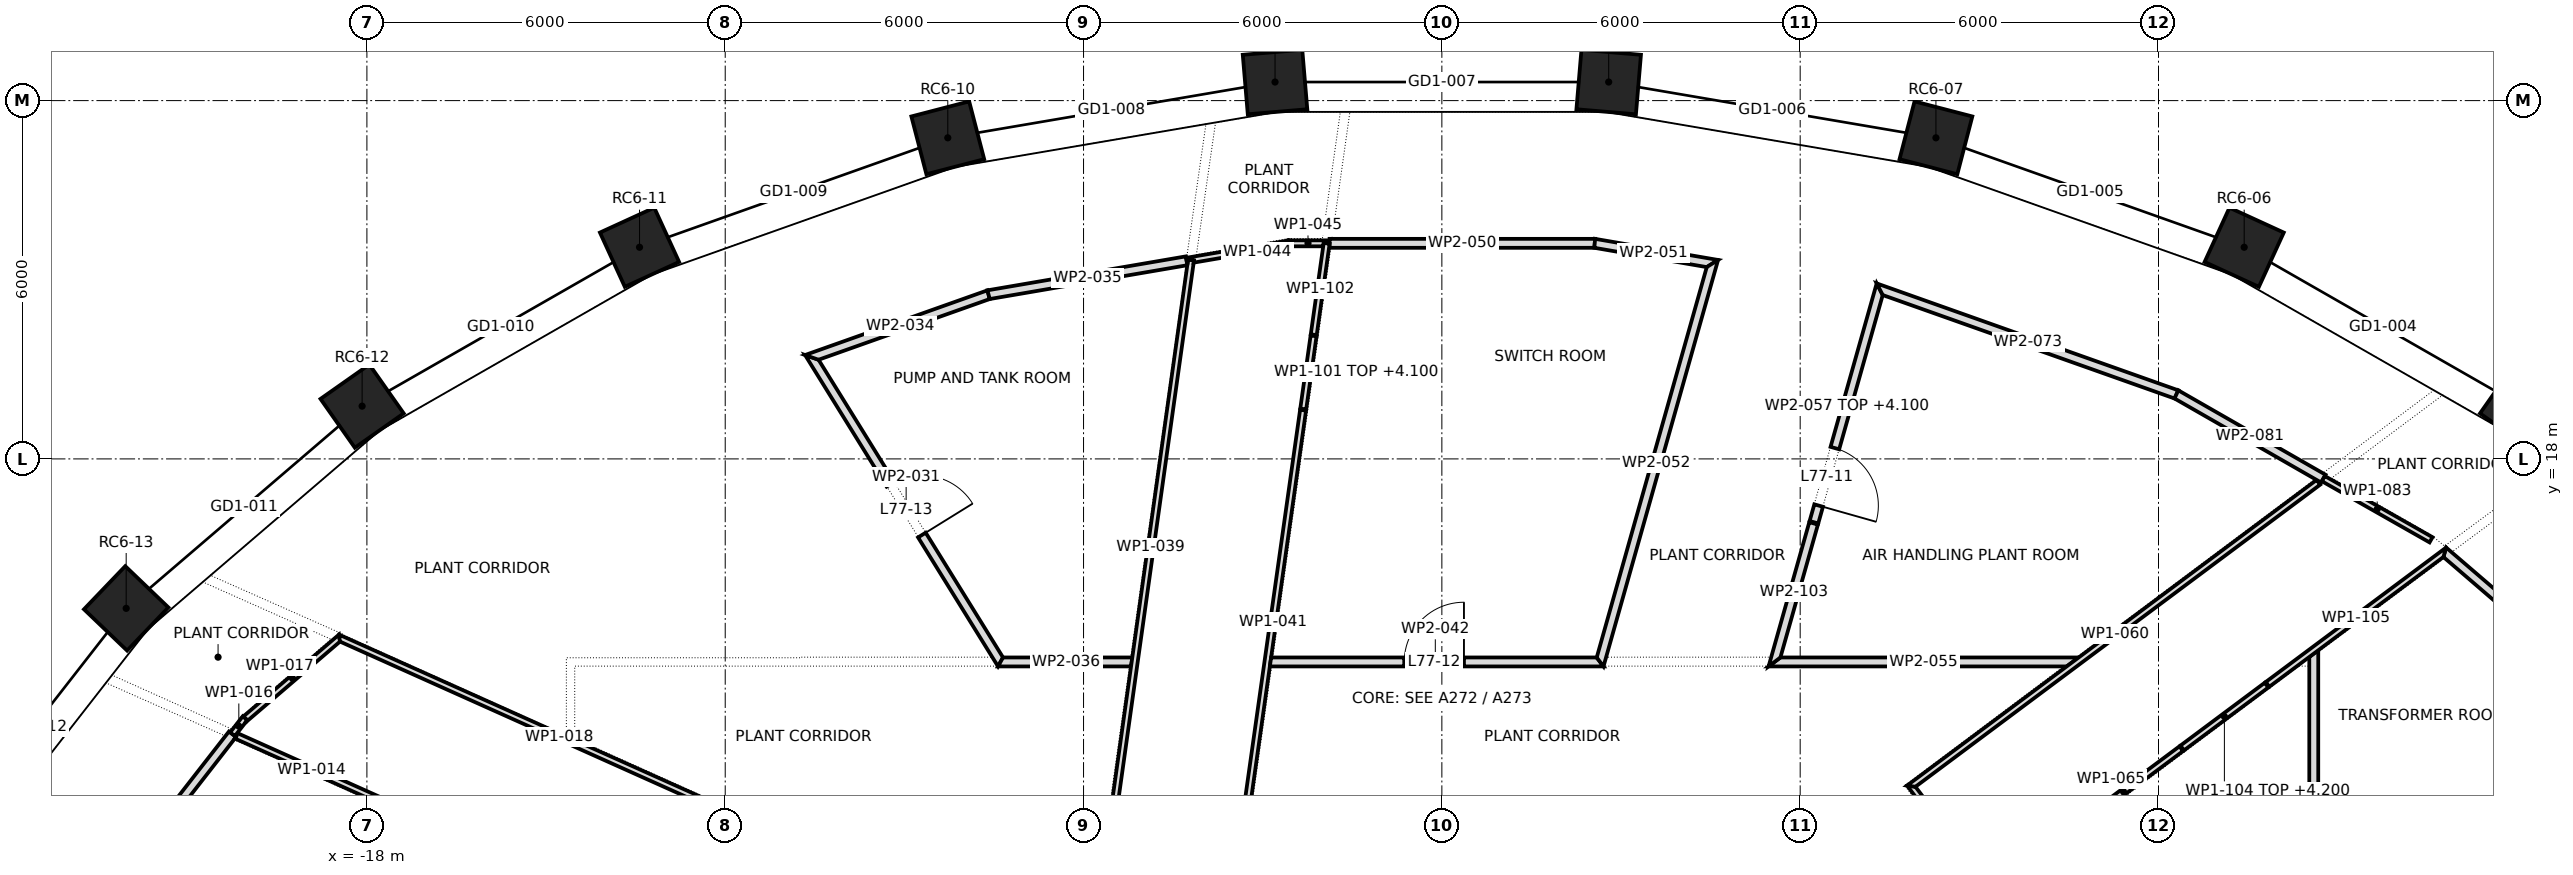
"""IFC4 building model, lengths in metres.
Left out: names, types, materials, properties, quantities, classifications, styles, units other than length and angle.
Written with IfcOpenShell. Run it as: python <this file> out.ifc"""

import sys

from ifc_helpers import new_model, si_unit, direction, frame, frame_2d, origin, origin_2d, place, context, subcontext, project, spatial, polyline, rectangle, outline, extrude, element, fill, save


model = new_model("IFC4")
c1 = context("Model", 3, precision=1e-05, world=origin(), true_north=direction((0.0, 1.0)))
c2 = subcontext(c1, "Body", "Model", "MODEL_VIEW")
j1 = project(units=[si_unit("LENGTHUNIT", "METRE"), si_unit("PLANEANGLEUNIT", "RADIAN")], contexts=[c1])
p1 = place(None, origin())
s1 = spatial("IfcSite", under=j1, at=p1, CompositionType="ELEMENT")
p2 = place(p1, origin())
s2 = spatial("IfcBuilding", under=s1, at=p2, CompositionType="ELEMENT")
p3 = place(p2, frame((0.0, 0.0, 328.3)))
s3 = spatial("IfcBuildingStorey", under=s2, at=p3, CompositionType="ELEMENT", Elevation=328.3)
for number, where, z_axis, x_axis in (
    (1, (18.08, 18.884, 0.0), (0.0, 0.0, 1.0), (-0.818, 0.575, 0.0)),
    (2, (13.435, 21.544, 0.0), (0.0, 0.0, 1.0), (-0.909, 0.417, 0.0)),
    (3, (8.273, 23.377, 0.0), (0.0, 0.0, 1.0), (-0.968, 0.252, 0.0)),
    (4, (2.793, 24.311, 0.0), (0.0, 0.0, 1.0), (-0.996, 0.084, 0.0)),
    (5, (-2.793, 24.311, 0.0), (0.0, 0.0, 1.0), (-0.996, -0.084, 0.0)),
    (6, (-8.273, 23.377, 0.0), (0.0, 0.0, 1.0), (-0.968, -0.252, 0.0)),
    (7, (-13.435, 21.544, 0.0), (0.0, 0.0, 1.0), (-0.909, -0.417, 0.0)),
    (8, (-18.08, 18.884, 0.0), (0.0, 0.0, 1.0), (-0.818, -0.575, 0.0)),
    (9, (-22.031, 15.497, 0.0), (0.0, 0.0, 1.0), (-0.692, -0.722, 0.0)),
):
    element("IfcColumn", number, at=place(p3, frame(where, z_axis=z_axis, x_axis=x_axis)), inside=s3, PredefinedType="COLUMN", context=c2, shape_type="SweptSolid", body=[
        extrude(rectangle(XDim=1.0, YDim=1.0, at=origin_2d()), origin(), (0.0, 0.0, 1.0), 5.0),
    ])
p4 = place(p3, frame((-20.25, 13.39, 0.0), z_axis=(0.0, 0.0, 1.0), x_axis=(-0.614788449528, -0.788692057984, 0.0)))
e10 = element("IfcWall", 10, at=p4, inside=s3, PredefinedType="PARTITIONING", context=c2, shape_type="SweptSolid", body=[
    extrude(outline(polyline([(4.205, -0.075), (4.205, -0.075), (4.189, 0.075), (2.792, 0.075), (1.396, 0.075), (0.0, 0.075), (0.0, -0.075), (1.402, -0.075), (2.803, -0.075), (4.205, -0.075)])), origin(), (0.0, 0.0, 1.0), 4.65),
])
p5 = place(p3, frame((-20.192, 13.364, 0.0), z_axis=(0.0, 0.0, 1.0), x_axis=(0.912635066967, -0.408775286121, 0.0)))
e11 = element("IfcWall", 11, at=p5, inside=s3, PredefinedType="PARTITIONING", context=c2, shape_type="SweptSolid", body=[
    extrude(outline(polyline([(0.0, 0.05), (0.0, -0.016), (0.009, -0.018), (0.001, -0.05), (1.387, -0.05), (2.773, -0.05), (2.773, 0.05), (1.386, 0.05), (0.0, 0.05)])), origin(), (0.0, 0.0, 1.0), 4.65),
])
p6 = place(p3, frame((-20.039, 13.659, 0.0), z_axis=(0.0, 0.0, 1.0), x_axis=(-0.61586559452, -0.787851235632, 0.0)))
e12 = element("IfcWall", 12, at=p6, inside=s3, PredefinedType="PARTITIONING", context=c2, shape_type="SweptSolid", body=[
    extrude(rectangle(XDim=0.342, YDim=0.1, at=frame_2d((0.171, 0.0))), origin(), (0.0, 0.0, 1.0), 4.65),
])
p7 = place(p3, frame((-18.435, 15.02, 0.0), z_axis=(0.0, 0.0, 1.0), x_axis=(-0.759626055976, -0.650360096471, 0.0)))
e13 = element("IfcWall", 13, at=p7, inside=s3, PredefinedType="PARTITIONING", context=c2, shape_type="SweptSolid", body=[
    extrude(outline(polyline([(0.0, -0.05), (2.112, -0.05), (2.094, 0.039), (2.145, 0.05), (2.145, 0.05), (0.063, 0.05), (0.034, 0.003), (0.0, -0.05)])), origin(), (0.0, 0.0, 1.0), 4.65),
])
p8 = place(p3, frame((-18.488, 15.012, 0.0), z_axis=(0.0, 0.0, 1.0), x_axis=(0.912473613394, -0.409135558048, 0.0)))
e14 = element("IfcWall", 14, at=p8, inside=s3, PredefinedType="PARTITIONING", context=c2, shape_type="SweptSolid", body=[
    extrude(outline(polyline([(0.0, 0.05), (0.0, 0.05), (0.063, -0.05), (1.67, -0.05), (3.277, -0.05), (4.883, -0.05), (6.49, -0.05), (8.096, -0.05), (8.096, 0.05), (6.477, 0.05), (4.858, 0.05), (3.239, 0.05), (1.619, 0.05), (0.0, 0.05)])), origin(), (0.0, 0.0, 1.0), 4.65),
])
p9 = place(p3, frame((-10.599, 19.779, 0.0), z_axis=(0.0, 0.0, 1.0), x_axis=(0.526721747685, -0.850037764171, 0.0)))
e15 = element("IfcWall", 15, at=p9, inside=s3, PredefinedType="PARTITIONING", context=c2, shape_type="SweptSolid", body=[
    extrude(outline(polyline([(0.0, -0.075), (1.534, -0.075), (3.067, -0.075), (4.601, -0.075), (6.135, -0.075), (6.051, 0.075), (4.096, 0.075), (2.141, 0.075), (0.186, 0.075), (0.0, -0.075), (0.0, -0.075)])), origin(), (0.0, 0.0, 1.0), 4.65),
])
p10 = place(p9, frame((2.593, 0.0, 0.0)))
e16 = element("IfcOpeningElement", 16, at=p10, cuts=e15, PredefinedType="OPENING", context=c2, shape_type="SweptSolid", body=[
    extrude(rectangle(XDim=1.0, YDim=2.1, at=frame_2d((0.5, 1.05))), frame((0.0, 0.087, 0.0), z_axis=(0.0, -1.0, 0.0), x_axis=(1.0, 0.0, 0.0)), (0.0, 0.0, 1.0), 0.174),
])
p11 = place(p3, frame((-7.584, 20.752, 0.0), z_axis=(0.0, 0.0, 1.0), x_axis=(-0.942459148143, -0.334321333571, 0.0)))
e17 = element("IfcWall", 17, at=p11, inside=s3, PredefinedType="PARTITIONING", context=c2, shape_type="SweptSolid", body=[
    extrude(outline(polyline([(0.0, -0.075), (1.62, -0.075), (3.24, -0.075), (3.054, 0.075), (1.533, 0.075), (0.013, 0.075), (0.0, -0.074), (0.0, -0.075)])), origin(), (0.0, 0.0, 1.0), 4.65),
])
p12 = place(p3, frame((-7.596, 20.749, 0.0), z_axis=(0.0, 0.0, 1.0), x_axis=(0.9856701175, 0.168684378254, 0.0)))
e18 = element("IfcWall", 18, at=p12, inside=s3, PredefinedType="PARTITIONING", context=c2, shape_type="SweptSolid", body=[
    extrude(outline(polyline([(3.371, 0.075), (1.686, 0.075), (0.0, 0.075), (0.013, -0.075), (1.692, -0.075), (3.371, -0.075), (3.371, 0.075)])), origin(), (0.0, 0.0, 1.0), 4.65),
])
p13 = place(p3, frame((-7.432, 14.6, 0.0), z_axis=(0.0, 0.0, 1.0), x_axis=(1.0, 0.0, 0.0)))
e19 = element("IfcWall", 19, at=p13, inside=s3, PredefinedType="PARTITIONING", context=c2, shape_type="SweptSolid", body=[
    extrude(outline(polyline([(0.0, -0.075), (2.228, -0.075), (2.248, 0.074), (2.248, 0.075), (0.084, 0.075), (0.084, 0.075), (0.084, 0.075), (0.042, 0.0), (0.0, -0.075)])), origin(), (0.0, 0.0, 1.0), 4.65),
])
p14 = place(p3, frame((-5.55, 11.7, 0.0), z_axis=(0.0, 0.0, 1.0), x_axis=(0.138844805467, 0.990314152173, 0.0)))
e20 = element("IfcWall", 20, at=p14, inside=s3, PredefinedType="PARTITIONING", context=c2, shape_type="SweptSolid", body=[
    extrude(rectangle(XDim=9.726, YDim=0.1, at=frame_2d((4.863, 0.0))), origin(), (0.0, 0.0, 1.0), 4.65),
])
p15 = place(p3, frame((-3.33, 11.7, 0.0), z_axis=(0.0, 0.0, 1.0), x_axis=(0.140005886866, 0.990150671182, 0.0)))
e21 = element("IfcWall", 21, at=p15, inside=s3, PredefinedType="PARTITIONING", context=c2, shape_type="SweptSolid", body=[
    extrude(rectangle(XDim=7.197, YDim=0.1, at=frame_2d((3.598, 0.0))), origin(), (0.0, 0.0, 1.0), 4.65),
])
p16 = place(p3, frame((-2.88, 14.6, 0.0), z_axis=(0.0, 0.0, 1.0), x_axis=(1.0, 0.0, 0.0)))
e22 = element("IfcWall", 22, at=p16, inside=s3, PredefinedType="PARTITIONING", context=c2, shape_type="SweptSolid", body=[
    extrude(outline(polyline([(0.0, -0.075), (1.862, -0.075), (3.724, -0.075), (5.587, -0.075), (5.53, 0.0), (5.473, 0.075), (5.473, 0.075), (5.473, 0.075), (3.656, 0.075), (1.838, 0.075), (0.021, 0.075), (0.0, -0.073), (0.0, -0.075)])), origin(), (0.0, 0.0, 1.0), 4.65),
])
p17 = place(p16, frame((2.25, 0.0, 0.0)))
e23 = element("IfcOpeningElement", 23, at=p17, cuts=e22, PredefinedType="OPENING", context=c2, shape_type="SweptSolid", body=[
    extrude(rectangle(XDim=1.0, YDim=2.1, at=frame_2d((0.5, 1.05))), frame((0.0, 0.087, 0.0), z_axis=(0.0, -1.0, 0.0), x_axis=(1.0, 0.0, 0.0)), (0.0, 0.0, 1.0), 0.174),
])
p18 = place(p3, frame((-2.556, 21.611, 0.0), z_axis=(0.0, 0.0, 1.0), x_axis=(-0.985746626095, -0.16823670569, 0.0)))
e24 = element("IfcWall", 24, at=p18, inside=s3, PredefinedType="PARTITIONING", context=c2, shape_type="SweptSolid", body=[
    extrude(outline(polyline([(0.0, -0.05), (1.743, -0.05), (1.743, 0.05), (1.736, 0.05), (1.715, -0.016), (1.62, 0.014), (1.631, 0.05), (0.008, 0.05), (0.008, 0.05), (0.008, 0.05), (0.004, 0.0), (0.0, -0.049), (0.0, -0.05)])), origin(), (0.0, 0.0, 1.0), 4.65),
])
p19 = place(p3, frame((-1.881, 21.61, 0.0), z_axis=(0.0, 0.0, 1.0), x_axis=(-1.0, 0.0, 0.0)))
e25 = element("IfcWall", 25, at=p19, inside=s3, PredefinedType="PARTITIONING", context=c2, shape_type="SweptSolid", body=[
    extrude(outline(polyline([(0.684, -0.05), (0.684, -0.05), (0.684, -0.05), (0.667, 0.049), (0.675, 0.05), (0.106, 0.05), (0.098, -0.007), (0.0, 0.007), (0.0, -0.05), (0.684, -0.05)])), origin(), (0.0, 0.0, 1.0), 4.65),
])
p20 = place(p3, frame((2.566, 21.61, 0.0), z_axis=(0.0, 0.0, 1.0), x_axis=(-1.0, 0.0, 0.0)))
e26 = element("IfcWall", 26, at=p20, inside=s3, PredefinedType="PARTITIONING", context=c2, shape_type="SweptSolid", body=[
    extrude(outline(polyline([(4.446, 0.075), (2.969, 0.075), (1.491, 0.075), (0.013, 0.075), (0.0, -0.075), (1.482, -0.075), (2.964, -0.075), (4.446, -0.075), (4.446, 0.075)])), origin(), (0.0, 0.0, 1.0), 4.65),
])
p21 = place(p3, frame((2.554, 21.611, 0.0), z_axis=(0.0, 0.0, 1.0), x_axis=(0.985576619606, -0.169229804956, 0.0)))
e27 = element("IfcWall", 27, at=p21, inside=s3, PredefinedType="PARTITIONING", context=c2, shape_type="SweptSolid", body=[
    extrude(outline(polyline([(0.013, -0.075), (1.922, -0.075), (2.089, 0.075), (2.089, 0.075), (0.0, 0.075), (0.0, 0.075), (0.013, -0.075)])), origin(), (0.0, 0.0, 1.0), 4.65),
])
p22 = place(p3, frame((2.635, 14.545, 0.0), z_axis=(0.0, 0.0, 1.0), x_axis=(0.271290420786, 0.962497536407, 0.0)))
e28 = element("IfcWall", 28, at=p22, inside=s3, PredefinedType="PARTITIONING", context=c2, shape_type="SweptSolid", body=[
    extrude(outline(polyline([(0.0, -0.075), (1.768, -0.075), (3.536, -0.075), (5.304, -0.075), (7.072, -0.075), (6.905, 0.075), (5.207, 0.075), (3.509, 0.075), (1.812, 0.075), (0.114, 0.075), (0.0, -0.075)])), origin(), (0.0, 0.0, 1.0), 4.65),
])
p23 = place(p3, frame((5.471, 14.6, 0.0), z_axis=(0.0, 0.0, 1.0), x_axis=(1.0, 0.0, 0.0)))
e29 = element("IfcWall", 29, at=p23, inside=s3, PredefinedType="PARTITIONING", context=c2, shape_type="SweptSolid", body=[
    extrude(outline(polyline([(0.0, -0.075), (1.664, -0.075), (3.328, -0.075), (4.992, -0.075), (5.193, 0.075), (5.193, 0.075), (3.528, 0.075), (1.863, 0.075), (0.198, 0.075), (0.198, 0.075), (0.198, 0.075), (0.099, 0.0), (0.0, -0.075)])), origin(), (0.0, 0.0, 1.0), 4.65),
])
p24 = place(p3, frame((7.354, 20.919, 0.0), z_axis=(0.0, 0.0, 1.0), x_axis=(-0.271630861441, -0.9624015145, 0.0)))
e30 = element("IfcWall", 30, at=p24, inside=s3, PredefinedType="PARTITIONING", context=c2, shape_type="SweptSolid", body=[
    extrude(outline(polyline([(4.144, 0.075), (2.152, 0.075), (0.16, 0.075), (0.0, -0.075), (1.382, -0.075), (2.763, -0.075), (4.144, -0.075), (4.144, 0.075)])), origin(), (0.0, 0.0, 1.0), 4.1),
])
p25 = place(p24, frame((2.844, 0.0, 0.0)))
e31 = element("IfcOpeningElement", 31, at=p25, cuts=e30, PredefinedType="OPENING", context=c2, shape_type="SweptSolid", body=[
    extrude(rectangle(XDim=1.0, YDim=2.1, at=frame_2d((0.5, 1.05))), frame((0.0, 0.087, 0.0), z_axis=(0.0, -1.0, 0.0), x_axis=(1.0, 0.0, 0.0)), (0.0, 0.0, 1.0), 0.174),
])
p26 = place(p3, frame((7.83, 12.56, 0.0), z_axis=(0.0, 0.0, 1.0), x_axis=(0.603146922662, -0.79763010831, 0.0)))
e32 = element("IfcWall", 32, at=p26, inside=s3, PredefinedType="PARTITIONING", context=c2, shape_type="SweptSolid", body=[
    extrude(outline(polyline([(1.078, 0.05), (0.101, 0.05), (0.0, -0.05), (0.0, -0.05), (1.078, -0.05), (1.078, 0.05)])), origin(), (0.0, 0.0, 1.0), 4.65),
])
p27 = place(p3, frame((7.82, 12.49, 0.0), z_axis=(0.0, 0.0, 1.0), x_axis=(0.801408213351, 0.598117777343, 0.0)))
e33 = element("IfcWall", 33, at=p27, inside=s3, PredefinedType="PARTITIONING", context=c2, shape_type="SweptSolid", body=[
    extrude(outline(polyline([(0.0, 0.05), (0.0, 0.05), (0.101, -0.05), (1.792, -0.05), (3.483, -0.05), (5.175, -0.05), (6.866, -0.05), (8.558, -0.05), (8.558, 0.05), (6.846, 0.05), (5.135, 0.05), (3.423, 0.05), (1.712, 0.05), (0.0, 0.05)])), origin(), (0.0, 0.0, 1.0), 4.65),
])
p28 = place(p3, frame((10.44, 11.7, 0.0), z_axis=(0.0, 0.0, 1.0), x_axis=(0.801719620775, 0.597700300873, 0.0)))
e34 = element("IfcWall", 34, at=p28, inside=s3, PredefinedType="PARTITIONING", context=c2, shape_type="SweptSolid", body=[
    extrude(outline(polyline([(0.0, 0.05), (0.0, -0.05), (2.432, -0.05), (2.432, 0.05), (0.0, 0.05)])), origin(), (0.0, 0.0, 1.0), 4.65),
])
p29 = place(p3, frame((12.306, 19.078, 0.0), z_axis=(0.0, 0.0, 1.0), x_axis=(-0.942502297723, 0.334199669042, 0.0)))
e35 = element("IfcWall", 35, at=p29, inside=s3, PredefinedType="PARTITIONING", context=c2, shape_type="SweptSolid", body=[
    extrude(outline(polyline([(0.0, -0.075), (1.786, -0.075), (3.572, -0.075), (5.358, -0.075), (5.198, 0.075), (3.47, 0.075), (1.742, 0.075), (0.014, 0.075), (0.0, -0.075)])), origin(), (0.0, 0.0, 1.0), 4.65),
])
p30 = place(p3, frame((14.6, 14.794, 0.0), z_axis=(0.0, 0.0, 1.0), x_axis=(0.0, -1.0, 0.0)))
e36 = element("IfcWall", 36, at=p30, inside=s3, PredefinedType="PARTITIONING", context=c2, shape_type="SweptSolid", body=[
    extrude(outline(polyline([(0.111, -0.075), (2.066, -0.075), (4.021, -0.075), (5.976, -0.075), (5.854, 0.0), (5.732, 0.075), (5.732, 0.075), (5.732, 0.075), (3.822, 0.075), (1.911, 0.075), (0.0, 0.075), (0.0, 0.074), (0.111, -0.075)])), origin(), (0.0, 0.0, 1.0), 4.65),
])
p31 = place(p3, frame((14.76, 17.67, 0.0), z_axis=(0.0, 0.0, 1.0), x_axis=(-0.867555136947, 0.497341014151, 0.0)))
e37 = element("IfcWall", 37, at=p31, inside=s3, PredefinedType="PARTITIONING", context=c2, shape_type="SweptSolid", body=[
    extrude(outline(polyline([(0.0, -0.075), (1.421, -0.075), (2.842, -0.075), (2.829, 0.075), (1.414, 0.075), (0.0, 0.075), (0.0, -0.075)])), origin(), (0.0, 0.0, 1.0), 4.65),
])
p32 = place(p3, frame((16.563, 16.645, 0.0), z_axis=(0.0, 0.0, 1.0), x_axis=(-0.86946460017, 0.493995252053, 0.0)))
e38 = element("IfcWall", 38, at=p32, inside=s3, PredefinedType="PARTITIONING", context=c2, shape_type="SweptSolid", body=[
    extrude(rectangle(XDim=2.074, YDim=0.1, at=frame_2d((1.037, 0.0))), origin(), (0.0, 0.0, 1.0), 4.65),
])
p33 = place(p3, frame((20.076, 13.615, 0.0), z_axis=(0.0, 0.0, 1.0), x_axis=(-0.758268185536, 0.651942757306, 0.0)))
e39 = element("IfcWall", 39, at=p33, inside=s3, PredefinedType="PARTITIONING", context=c2, shape_type="SweptSolid", body=[
    extrude(outline(polyline([(0.0, -0.075), (1.454, -0.075), (2.908, -0.075), (4.363, -0.075), (4.294, 0.075), (2.867, 0.075), (1.441, 0.075), (0.015, 0.075), (0.0, -0.075)])), origin(), (0.0, 0.0, 1.0), 4.65),
])
p34 = place(p3, frame((-2.323, 18.826, 0.0), z_axis=(0.0, 0.0, 1.0), x_axis=(0.139870946511, 0.990169742177, 0.0)))
e40 = element("IfcWall", 40, at=p34, inside=s3, PredefinedType="PARTITIONING", context=c2, shape_type="SweptSolid", body=[
    extrude(rectangle(XDim=1.257, YDim=0.1, at=frame_2d((0.628, 0.0))), origin(), (0.0, 0.0, 1.0), 4.1),
])
p35 = place(p3, frame((-2.147, 20.07, 0.0), z_axis=(0.0, 0.0, 1.0), x_axis=(0.140036551546, 0.990146334756, 0.0)))
e41 = element("IfcWall", 41, at=p35, inside=s3, PredefinedType="PARTITIONING", context=c2, shape_type="SweptSolid", body=[
    extrude(rectangle(XDim=1.555, YDim=0.1, at=frame_2d((0.778, 0.0))), origin(), (0.0, 0.0, 1.0), 4.65),
])
p36 = place(p3, frame((6.228, 16.93, 0.0), z_axis=(0.0, 0.0, 1.0), x_axis=(-0.271623518644, -0.962403586922, 0.0)))
e42 = element("IfcWall", 42, at=p36, inside=s3, PredefinedType="PARTITIONING", context=c2, shape_type="SweptSolid", body=[
    extrude(outline(polyline([(0.0, -0.075), (1.26, -0.075), (2.52, -0.075), (2.322, 0.075), (0.0, 0.075), (0.0, -0.075)])), origin(), (0.0, 0.0, 1.0), 4.65),
])
p37 = place(p3, frame((12.389, 13.153, 0.0), z_axis=(0.0, 0.0, 1.0), x_axis=(0.801690929697, 0.597738783451, 0.0)))
e43 = element("IfcWall", 43, at=p37, inside=s3, PredefinedType="PARTITIONING", context=c2, shape_type="SweptSolid", body=[
    extrude(outline(polyline([(0.0, 0.05), (0.0, -0.05), (1.781, -0.05), (1.781, 0.05), (0.0, 0.05)])), origin(), (0.0, 0.0, 1.0), 4.2),
])
p38 = place(p3, frame((13.817, 14.218, 0.0), z_axis=(0.0, 0.0, 1.0), x_axis=(0.801741359851, 0.597671140264, 0.0)))
e44 = element("IfcWall", 44, at=p38, inside=s3, PredefinedType="PARTITIONING", context=c2, shape_type="SweptSolid", body=[
    extrude(outline(polyline([(0.0, -0.05), (1.823, -0.05), (3.647, -0.05), (3.778, 0.05), (3.778, 0.05), (1.889, 0.05), (0.0, 0.05), (0.0, -0.05)])), origin(), (0.0, 0.0, 1.0), 4.65),
])
p39 = place(p25, origin())
e45 = element("IfcDoor", 45, at=p39, inside=s3, OperationType="SINGLE_SWING_LEFT", PredefinedType="DOOR", context=c2, shape_type="SweptSolid", body=[
    extrude(rectangle(XDim=1.0, YDim=2.1, at=frame_2d((0.5, 1.05))), frame((0.0, 0.025, 0.0), z_axis=(0.0, -1.0, 0.0), x_axis=(1.0, 0.0, 0.0)), (0.0, 0.0, 1.0), 0.05),
])
fill(e31, e45)
p40 = place(p17, origin())
e46 = element("IfcDoor", 46, at=p40, inside=s3, OperationType="SINGLE_SWING_LEFT", PredefinedType="DOOR", context=c2, shape_type="SweptSolid", body=[
    extrude(rectangle(XDim=1.0, YDim=2.1, at=frame_2d((0.5, 1.05))), frame((0.0, 0.025, 0.0), z_axis=(0.0, -1.0, 0.0), x_axis=(1.0, 0.0, 0.0)), (0.0, 0.0, 1.0), 0.05),
])
fill(e23, e46)
p41 = place(p10, origin())
e47 = element("IfcDoor", 47, at=p41, inside=s3, OperationType="SINGLE_SWING_LEFT", PredefinedType="DOOR", context=c2, shape_type="SweptSolid", body=[
    extrude(rectangle(XDim=1.0, YDim=2.1, at=frame_2d((0.5, 1.05))), frame((0.0, 0.025, 0.0), z_axis=(0.0, -1.0, 0.0), x_axis=(1.0, 0.0, 0.0)), (0.0, 0.0, 1.0), 0.05),
])
fill(e16, e47)
save(model, sys.argv[1])
